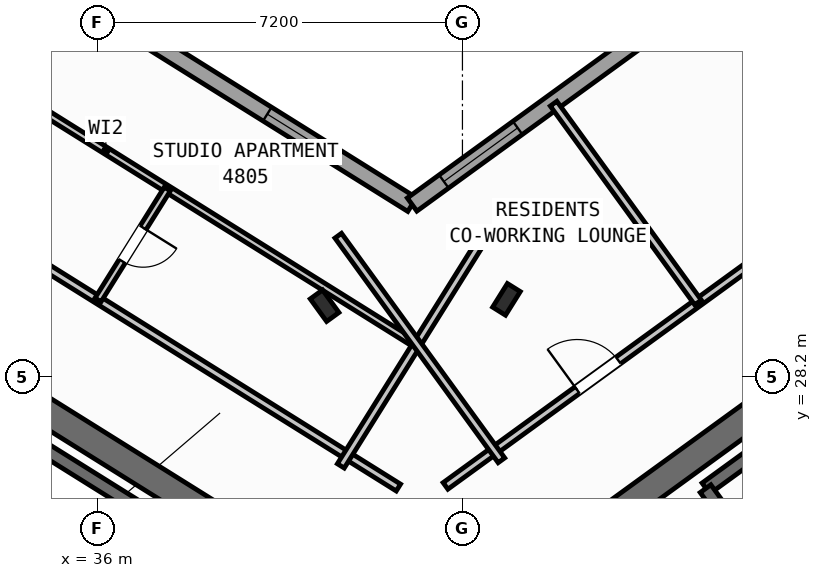
"""IFC4 building model, lengths in metres.
Left out: names, types, materials, properties, quantities, classifications, styles, units other than length and angle.
Written with IfcOpenShell. Run it as: python <this file> out.ifc"""

import sys

from ifc_helpers import new_model, si_unit, direction, frame, frame_2d, origin, origin_2d, place, context, subcontext, project, spatial, rectangle, i_section, extrude, source, transform, mapped, element, fill, save


model = new_model("IFC4")
c1 = context("Model", 3, precision=1e-05, world=origin(), true_north=direction((0.0, 1.0)))
c2 = subcontext(c1, "Body", "Model", "MODEL_VIEW")
j1 = project(units=[si_unit("LENGTHUNIT", "METRE"), si_unit("PLANEANGLEUNIT", "RADIAN")], contexts=[c1])
p1 = place(None, origin())
s1 = spatial("IfcSite", under=j1, at=p1, CompositionType="ELEMENT")
p2 = place(p1, origin())
s2 = spatial("IfcBuilding", under=s1, at=p2, CompositionType="ELEMENT")
p3 = place(p2, frame((0.0, 0.0, 191.4)))
s3 = spatial("IfcBuildingStorey", under=s2, at=p3, CompositionType="ELEMENT", Elevation=191.4)
p4 = place(p3, frame((40.573, 24.01, 0.0), z_axis=(0.0, 0.0, 1.0), x_axis=(-0.848047359947, 0.529920442413, 0.0)))
e1 = element("IfcWall", 1, at=p4, inside=s3, PredefinedType="SHEAR", context=c2, shape_type="SweptSolid", body=[
    extrude(rectangle(XDim=13.14, YDim=0.55, at=frame_2d((6.57, 0.0))), origin(), (0.0, 0.0, 1.0), 3.32),
])
p5 = place(p3, frame((44.365, 24.142, 0.0), z_axis=(0.0, 0.0, 1.0), x_axis=(0.809024304885, 0.587775190107, 0.0)))
e2 = element("IfcWall", 2, at=p5, inside=s3, PredefinedType="SHEAR", context=c2, shape_type="SweptSolid", body=[
    extrude(rectangle(XDim=12.34, YDim=0.55, at=frame_2d((6.17, 0.0))), origin(), (0.0, 0.0, 1.0), 3.32),
])
m1 = source(origin(), c2, "Body", "SweptSolid", [
    extrude(i_section(OverallWidth=0.3, OverallDepth=0.55, WebThickness=0.015, FlangeThickness=0.029, at=origin_2d()), origin(), (0.0, 0.0, 1.0), 3.6),
])
for number, where, z_axis, x_axis in (
    (3, (44.068, 29.726, 0.0), (0.0, 0.0, 1.0), (-0.848, 0.53, 0.0)),
    (4, (40.479, 29.601, 0.0), (0.0, 0.0, 1.0), (0.809, 0.588, 0.0)),
):
    element("IfcColumn", number, at=place(p3, frame(where, z_axis=z_axis, x_axis=x_axis)), inside=s3, PredefinedType="COLUMN", context=c2, shape_type="MappedRepresentation", body=[
        mapped(m1, transform((0.0, 0.0, 0.0), scale=1.0)),
    ])
p6 = place(p3, frame((17.424, 47.083, 0.0), z_axis=(0.0, 0.0, 1.0), x_axis=(0.848049927979, -0.529916332693, 0.0)))
e5 = element("IfcWall", 5, at=p6, inside=s3, PredefinedType="STANDARD", context=c2, shape_type="SweptSolid", body=[
    extrude(rectangle(XDim=29.223, YDim=0.32, at=frame_2d((14.612, 0.0))), origin(), (0.0, 0.0, 1.0), 3.32),
])
p7 = place(p6, frame((3.764, 0.0, 0.0)))
e6 = element("IfcOpeningElement", 6, at=p7, cuts=e5, PredefinedType="OPENING", context=c2, shape_type="SweptSolid", body=[
    extrude(rectangle(XDim=1.05, YDim=2.15, at=frame_2d((0.525, 1.075))), frame((0.0, 0.17, 0.0), z_axis=(0.0, -1.0, 0.0), x_axis=(1.0, 0.0, 0.0)), (0.0, 0.0, 1.0), 0.34),
])
p8 = place(p6, frame((8.344, 0.0, 0.8)))
e7 = element("IfcOpeningElement", 7, at=p8, cuts=e5, PredefinedType="OPENING", context=c2, shape_type="SweptSolid", body=[
    extrude(rectangle(XDim=2.1, YDim=1.55, at=frame_2d((1.05, 0.775))), frame((0.0, 0.17, 0.0), z_axis=(0.0, -1.0, 0.0), x_axis=(1.0, 0.0, 0.0)), (0.0, 0.0, 1.0), 0.34),
])
p9 = place(p6, frame((13.589, 0.0, 0.85)))
e8 = element("IfcOpeningElement", 8, at=p9, cuts=e5, PredefinedType="OPENING", context=c2, shape_type="SweptSolid", body=[
    extrude(rectangle(XDim=1.8, YDim=1.5, at=frame_2d((0.9, 0.75))), frame((0.0, 0.17, 0.0), z_axis=(0.0, -1.0, 0.0), x_axis=(1.0, 0.0, 0.0)), (0.0, 0.0, 1.0), 0.34),
])
p10 = place(p6, frame((17.104, 0.0, 0.95)))
e9 = element("IfcOpeningElement", 9, at=p10, cuts=e5, PredefinedType="OPENING", context=c2, shape_type="SweptSolid", body=[
    extrude(rectangle(XDim=1.2, YDim=1.4, at=frame_2d((0.6, 0.7))), frame((0.0, 0.17, 0.0), z_axis=(0.0, -1.0, 0.0), x_axis=(1.0, 0.0, 0.0)), (0.0, 0.0, 1.0), 0.34),
])
p11 = place(p6, frame((21.214, 0.0, 0.95)))
e10 = element("IfcOpeningElement", 10, at=p11, cuts=e5, PredefinedType="OPENING", context=c2, shape_type="SweptSolid", body=[
    extrude(rectangle(XDim=1.2, YDim=1.4, at=frame_2d((0.6, 0.7))), frame((0.0, 0.17, 0.0), z_axis=(0.0, -1.0, 0.0), x_axis=(1.0, 0.0, 0.0)), (0.0, 0.0, 1.0), 0.34),
])
p12 = place(p6, frame((25.853, 0.0, 0.95)))
e11 = element("IfcOpeningElement", 11, at=p12, cuts=e5, PredefinedType="OPENING", context=c2, shape_type="SweptSolid", body=[
    extrude(rectangle(XDim=1.2, YDim=1.4, at=frame_2d((0.6, 0.7))), frame((0.0, 0.17, 0.0), z_axis=(0.0, -1.0, 0.0), x_axis=(1.0, 0.0, 0.0)), (0.0, 0.0, 1.0), 0.34),
])
p13 = place(p3, frame((42.207, 31.597, 0.0), z_axis=(0.0, 0.0, 1.0), x_axis=(0.809020333377, 0.587780656523, 0.0)))
e12 = element("IfcWall", 12, at=p13, inside=s3, PredefinedType="STANDARD", context=c2, shape_type="SweptSolid", body=[
    extrude(rectangle(XDim=15.223, YDim=0.32, at=frame_2d((7.611, 0.0))), origin(), (0.0, 0.0, 1.0), 3.32),
])
p14 = place(p13, frame((12.82, 0.0, 0.0)))
e13 = element("IfcOpeningElement", 13, at=p14, cuts=e12, PredefinedType="OPENING", context=c2, shape_type="SweptSolid", body=[
    extrude(rectangle(XDim=1.05, YDim=2.15, at=frame_2d((0.525, 1.075))), frame((0.0, 0.17, 0.0), z_axis=(0.0, -1.0, 0.0), x_axis=(1.0, 0.0, 0.0)), (0.0, 0.0, 1.0), 0.34),
])
p15 = place(p13, frame((0.775, 0.0, 0.85)))
e14 = element("IfcOpeningElement", 14, at=p15, cuts=e12, PredefinedType="OPENING", context=c2, shape_type="SweptSolid", body=[
    extrude(rectangle(XDim=1.8, YDim=1.5, at=frame_2d((0.9, 0.75))), frame((0.0, 0.17, 0.0), z_axis=(0.0, -1.0, 0.0), x_axis=(1.0, 0.0, 0.0)), (0.0, 0.0, 1.0), 0.34),
])
p16 = place(p13, frame((5.544, 0.0, 0.85)))
e15 = element("IfcOpeningElement", 15, at=p16, cuts=e12, PredefinedType="OPENING", context=c2, shape_type="SweptSolid", body=[
    extrude(rectangle(XDim=1.8, YDim=1.5, at=frame_2d((0.9, 0.75))), frame((0.0, 0.17, 0.0), z_axis=(0.0, -1.0, 0.0), x_axis=(1.0, 0.0, 0.0)), (0.0, 0.0, 1.0), 0.34),
])
p17 = place(p13, frame((10.219, 0.0, 1.0)))
e16 = element("IfcOpeningElement", 16, at=p17, cuts=e12, PredefinedType="OPENING", context=c2, shape_type="SweptSolid", body=[
    extrude(rectangle(XDim=0.9, YDim=1.25, at=frame_2d((0.45, 0.625))), frame((0.0, 0.17, 0.0), z_axis=(0.0, -1.0, 0.0), x_axis=(1.0, 0.0, 0.0)), (0.0, 0.0, 1.0), 0.34),
])
p18 = place(p3, frame((39.721, 23.788, 0.0), z_axis=(0.0, 0.0, 1.0), x_axis=(-0.848054434086, 0.529909121291, 0.0)))
e17 = element("IfcWall", 17, at=p18, inside=s3, PredefinedType="SHEAR", context=c2, shape_type="SweptSolid", body=[
    extrude(rectangle(XDim=7.33, YDim=0.26, at=frame_2d((3.665, 0.0))), origin(), (0.0, 0.0, 1.0), 3.32),
])
p19 = place(p3, frame((48.006, 25.996, 0.0), z_axis=(0.0, 0.0, 1.0), x_axis=(0.80901903764, 0.587782439969, 0.0)))
e18 = element("IfcWall", 18, at=p19, inside=s3, PredefinedType="SHEAR", context=c2, shape_type="SweptSolid", body=[
    extrude(rectangle(XDim=7.46, YDim=0.26, at=frame_2d((3.73, 0.0))), origin(), (0.0, 0.0, 1.0), 3.32),
])
p20 = place(p3, frame((49.855, 23.434, 0.0), z_axis=(0.0, 0.0, 1.0), x_axis=(-0.58776738483, 0.809029975545, 0.0)))
e19 = element("IfcWall", 19, at=p20, inside=s3, PredefinedType="SHEAR", context=c2, shape_type="SweptSolid", body=[
    extrude(rectangle(XDim=3.16, YDim=0.26, at=frame_2d((1.58, 0.0))), origin(), (0.0, 0.0, 1.0), 3.32),
])
p21 = place(p3, frame((41.936, 26.012, 0.0), z_axis=(0.0, 0.0, 1.0), x_axis=(-0.848051154596, 0.529914369676, 0.0)))
e20 = element("IfcWall", 20, at=p21, inside=s3, PredefinedType="PARTITIONING", context=c2, shape_type="SweptSolid", body=[
    extrude(rectangle(XDim=15.57, YDim=0.16, at=frame_2d((7.785, 0.0))), origin(), (0.0, 0.0, 1.0), 3.31),
])
p22 = place(p21, frame((10.83, 0.0, 0.0)))
e21 = element("IfcOpeningElement", 21, at=p22, cuts=e20, PredefinedType="OPENING", context=c2, shape_type="SweptSolid", body=[
    extrude(rectangle(XDim=1.0, YDim=2.1, at=frame_2d((0.5, 1.05))), frame((0.0, 0.09, 0.0), z_axis=(0.0, -1.0, 0.0), x_axis=(1.0, 0.0, 0.0)), (0.0, 0.0, 1.0), 0.18),
])
p23 = place(p3, frame((43.704, 31.086, 0.0), z_axis=(0.0, 0.0, 1.0), x_axis=(-0.529906828443, -0.848055866774, 0.0)))
e22 = element("IfcWall", 22, at=p23, inside=s3, PredefinedType="PARTITIONING", context=c2, shape_type="SweptSolid", body=[
    extrude(rectangle(XDim=5.48, YDim=0.16, at=frame_2d((2.74, 0.0))), origin(), (0.0, 0.0, 1.0), 3.31),
])
p24 = place(p3, frame((42.226, 28.873, 0.0), z_axis=(0.0, 0.0, 1.0), x_axis=(-0.848049134363, 0.529917602752, 0.0)))
e23 = element("IfcWall", 23, at=p24, inside=s3, PredefinedType="PLUMBINGWALL", context=c2, shape_type="SweptSolid", body=[
    extrude(rectangle(XDim=14.3, YDim=0.14, at=frame_2d((7.15, 0.0))), origin(), (0.0, 0.0, 1.0), 3.31),
])
p25 = place(p24, frame((9.57, 0.0, 0.0)))
e24 = element("IfcOpeningElement", 24, at=p25, cuts=e23, PredefinedType="OPENING", context=c2, shape_type="SweptSolid", body=[
    extrude(rectangle(XDim=0.92, YDim=2.08, at=frame_2d((0.46, 1.04))), frame((0.0, 0.08, 0.0), z_axis=(0.0, -1.0, 0.0), x_axis=(1.0, 0.0, 0.0)), (0.0, 0.0, 1.0), 0.16),
])
p26 = place(p3, frame((37.375, 31.904, 0.0), z_axis=(0.0, 0.0, 1.0), x_axis=(-0.529913878929, -0.848051461244, 0.0)))
e25 = element("IfcWall", 25, at=p26, inside=s3, PredefinedType="PLUMBINGWALL", context=c2, shape_type="SweptSolid", body=[
    extrude(rectangle(XDim=2.58, YDim=0.14, at=frame_2d((1.29, 0.0))), origin(), (0.0, 0.0, 1.0), 3.31),
])
p27 = place(p26, frame((0.9, 0.0, 0.0)))
e26 = element("IfcOpeningElement", 26, at=p27, cuts=e25, PredefinedType="OPENING", context=c2, shape_type="SweptSolid", body=[
    extrude(rectangle(XDim=0.78, YDim=2.05, at=frame_2d((0.39, 1.025))), frame((0.0, 0.08, 0.0), z_axis=(0.0, -1.0, 0.0), x_axis=(1.0, 0.0, 0.0)), (0.0, 0.0, 1.0), 0.16),
])
p28 = place(p3, frame((42.866, 26.044, 0.0), z_axis=(0.0, 0.0, 1.0), x_axis=(0.809020254154, 0.587780765566, 0.0)))
e27 = element("IfcWall", 27, at=p28, inside=s3, PredefinedType="PARTITIONING", context=c2, shape_type="SweptSolid", body=[
    extrude(rectangle(XDim=14.67, YDim=0.16, at=frame_2d((7.335, 0.0))), origin(), (0.0, 0.0, 1.0), 3.31),
])
p29 = place(p28, frame((3.215, 0.0, 0.0)))
e28 = element("IfcOpeningElement", 28, at=p29, cuts=e27, PredefinedType="OPENING", context=c2, shape_type="SweptSolid", body=[
    extrude(rectangle(XDim=1.0, YDim=2.1, at=frame_2d((0.5, 1.05))), frame((0.0, 0.09, 0.0), z_axis=(0.0, -1.0, 0.0), x_axis=(1.0, 0.0, 0.0)), (0.0, 0.0, 1.0), 0.18),
])
p30 = place(p28, frame((9.915, 0.0, 0.0)))
e29 = element("IfcOpeningElement", 29, at=p30, cuts=e27, PredefinedType="OPENING", context=c2, shape_type="SweptSolid", body=[
    extrude(rectangle(XDim=1.0, YDim=2.1, at=frame_2d((0.5, 1.05))), frame((0.0, 0.09, 0.0), z_axis=(0.0, -1.0, 0.0), x_axis=(1.0, 0.0, 0.0)), (0.0, 0.0, 1.0), 0.18),
])
p31 = place(p3, frame((43.969, 26.55, 0.0), z_axis=(0.0, 0.0, 1.0), x_axis=(-0.587776919386, 0.80902304852, 0.0)))
e30 = element("IfcWall", 30, at=p31, inside=s3, PredefinedType="PARTITIONING", context=c2, shape_type="SweptSolid", body=[
    extrude(rectangle(XDim=5.48, YDim=0.16, at=frame_2d((2.74, 0.0))), origin(), (0.0, 0.0, 1.0), 3.31),
])
p32 = place(p3, frame((47.849, 29.665, 0.0), z_axis=(0.0, 0.0, 1.0), x_axis=(-0.587785532001, 0.809016791155, 0.0)))
e31 = element("IfcWall", 31, at=p32, inside=s3, PredefinedType="PARTITIONING", context=c2, shape_type="SweptSolid", body=[
    extrude(rectangle(XDim=4.85, YDim=0.16, at=frame_2d((2.425, 0.0))), origin(), (0.0, 0.0, 1.0), 3.31),
])
m2 = source(origin(), c2, "Body", "SweptSolid", [
    extrude(rectangle(XDim=1.2, YDim=1.4, at=frame_2d((0.6, 0.7))), frame((0.0, 0.03, 0.0), z_axis=(0.0, -1.0, 0.0), x_axis=(1.0, 0.0, 0.0)), (0.0, 0.0, 1.0), 0.06),
])
p33 = place(p12, origin())
e32 = element("IfcWindow", 32, at=p33, inside=s3, PartitioningType="SINGLE_PANEL", PredefinedType="WINDOW", context=c2, shape_type="MappedRepresentation", body=[
    mapped(m2, transform((0.0, 0.0, 0.0), scale=1.0)),
])
fill(e11, e32)
m3 = source(origin(), c2, "Body", "SweptSolid", [
    extrude(rectangle(XDim=1.8, YDim=1.5, at=frame_2d((0.9, 0.75))), frame((0.0, 0.03, 0.0), z_axis=(0.0, -1.0, 0.0), x_axis=(1.0, 0.0, 0.0)), (0.0, 0.0, 1.0), 0.06),
])
p34 = place(p15, origin())
e33 = element("IfcWindow", 33, at=p34, inside=s3, PartitioningType="SINGLE_PANEL", PredefinedType="WINDOW", context=c2, shape_type="MappedRepresentation", body=[
    mapped(m3, transform((0.0, 0.0, 0.0), scale=1.0)),
])
fill(e14, e33)
m4 = source(origin(), c2, "Body", "SweptSolid", [
    extrude(rectangle(XDim=0.78, YDim=2.05, at=frame_2d((0.39, 1.025))), frame((0.0, 0.025, 0.0), z_axis=(0.0, -1.0, 0.0), x_axis=(1.0, 0.0, 0.0)), (0.0, 0.0, 1.0), 0.05),
])
p35 = place(p27, origin())
e34 = element("IfcDoor", 34, at=p35, inside=s3, OperationType="SINGLE_SWING_LEFT", PredefinedType="DOOR", context=c2, shape_type="MappedRepresentation", body=[
    mapped(m4, transform((0.0, 0.0, 0.0), scale=1.0)),
])
fill(e26, e34)
m5 = source(origin(), c2, "Body", "SweptSolid", [
    extrude(rectangle(XDim=1.0, YDim=2.1, at=frame_2d((0.5, 1.05))), frame((0.0, 0.025, 0.0), z_axis=(0.0, -1.0, 0.0), x_axis=(1.0, 0.0, 0.0)), (0.0, 0.0, 1.0), 0.05),
])
p36 = place(p29, origin())
e35 = element("IfcDoor", 35, at=p36, inside=s3, OperationType="SINGLE_SWING_LEFT", PredefinedType="DOOR", context=c2, shape_type="MappedRepresentation", body=[
    mapped(m5, transform((0.0, 0.0, 0.0), scale=1.0)),
])
fill(e28, e35)
save(model, sys.argv[1])
